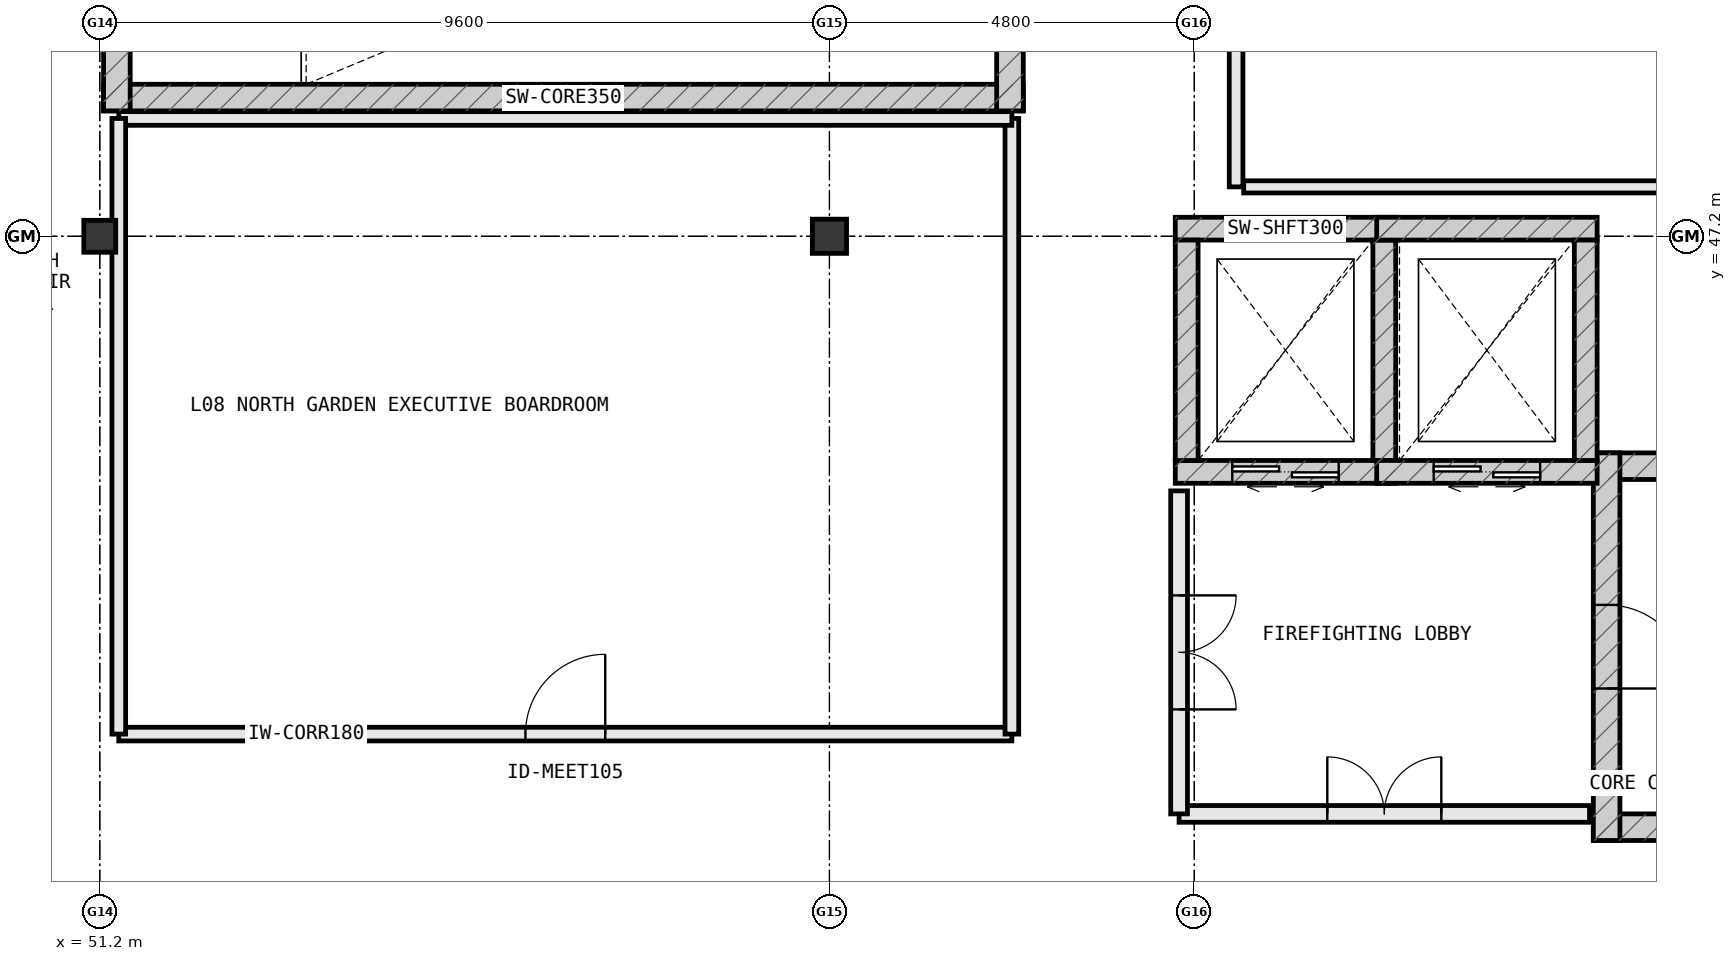
"""IFC4 building model, lengths in metres.
Left out: names, types, materials, properties, quantities, classifications, styles, units other than length and angle.
Written with IfcOpenShell. Run it as: python <this file> out.ifc"""

import sys

from ifc_helpers import new_model, si_unit, direction, frame, frame_2d, origin, origin_2d, place, context, subcontext, project, spatial, rectangle, extrude, element, fill, save


model = new_model("IFC4")
c1 = context("Model", 3, precision=1e-05, world=origin(), true_north=direction((0.0, 1.0)))
c2 = subcontext(c1, "Body", "Model", "MODEL_VIEW")
j1 = project(units=[si_unit("LENGTHUNIT", "METRE"), si_unit("PLANEANGLEUNIT", "RADIAN")], contexts=[c1])
p1 = place(None, origin())
s1 = spatial("IfcSite", under=j1, at=p1, CompositionType="ELEMENT")
p2 = place(p1, origin())
s2 = spatial("IfcBuilding", under=s1, at=p2, CompositionType="ELEMENT")
p3 = place(p2, frame((0.0, 0.0, 35.2)))
s3 = spatial("IfcBuildingStorey", under=s2, at=p3, CompositionType="ELEMENT", Elevation=35.2)
p4 = place(p3, frame((60.8, 47.2, 0.0), z_axis=(0.0, 0.0, 1.0), x_axis=(1.0, 0.0, 0.0)))
e1 = element("IfcColumn", 1, at=p4, inside=s3, PredefinedType="COLUMN", context=c2, shape_type="SweptSolid", body=[
    extrude(rectangle(XDim=0.45, YDim=0.45, at=origin_2d()), origin(), (0.0, 0.0, 1.0), 3.8),
])
p5 = place(p3, frame((51.2, 47.2, 0.0), z_axis=(0.0, 0.0, 1.0), x_axis=(1.0, 0.0, 0.0)))
e2 = element("IfcColumn", 2, at=p5, inside=s3, PredefinedType="COLUMN", context=c2, shape_type="SweptSolid", body=[
    extrude(rectangle(XDim=0.42, YDim=0.42, at=origin_2d()), origin(), (0.0, 0.0, 1.0), 3.8),
])
for number, where, z_axis, x_axis in (
    (3, (70.85, 39.425, 0.0), (0.0, 0.0, 1.0), (1.0, 0.0, 0.0)),
    (4, (82.95, 44.175, 0.0), (0.0, 0.0, 1.0), (-1.0, 0.0, 0.0)),
):
    element("IfcWall", number, at=place(p3, frame(where, z_axis=z_axis, x_axis=x_axis)), inside=s3, PredefinedType="SHEAR", context=c2, shape_type="SweptSolid", body=[
        extrude(rectangle(XDim=12.1, YDim=0.35, at=frame_2d((6.05, 0.0))), origin(), (0.0, 0.0, 1.0), 3.8),
    ])
p6 = place(p3, frame((71.025, 44.35, 0.0), z_axis=(0.0, 0.0, 1.0), x_axis=(0.0, -1.0, 0.0)))
e5 = element("IfcWall", 5, at=p6, inside=s3, PredefinedType="SHEAR", context=c2, shape_type="SweptSolid", body=[
    extrude(rectangle(XDim=5.1, YDim=0.35, at=frame_2d((2.55, 0.0))), origin(), (0.0, 0.0, 1.0), 3.8),
])
p7 = place(p6, frame((2.0, 0.0, 0.0)))
e6 = element("IfcOpeningElement", 6, at=p7, cuts=e5, PredefinedType="OPENING", context=c2, shape_type="SweptSolid", body=[
    extrude(rectangle(XDim=1.1, YDim=2.2, at=frame_2d((0.55, 1.1))), frame((0.0, 0.187, 0.0), z_axis=(0.0, -1.0, 0.0), x_axis=(1.0, 0.0, 0.0)), (0.0, 0.0, 1.0), 0.374),
])
p8 = place(p3, frame((51.25, 49.025, 0.0), z_axis=(0.0, 0.0, 1.0), x_axis=(1.0, 0.0, 0.0)))
e7 = element("IfcWall", 7, at=p8, inside=s3, PredefinedType="SHEAR", context=c2, shape_type="SweptSolid", body=[
    extrude(rectangle(XDim=12.1, YDim=0.35, at=frame_2d((6.05, 0.0))), origin(), (0.0, 0.0, 1.0), 3.565),
])
p9 = place(p3, frame((63.175, 48.85, 0.0), z_axis=(0.0, 0.0, 1.0), x_axis=(0.0, 1.0, 0.0)))
e8 = element("IfcWall", 8, at=p9, inside=s3, PredefinedType="SHEAR", context=c2, shape_type="SweptSolid", body=[
    extrude(rectangle(XDim=4.5, YDim=0.35, at=frame_2d((2.25, 0.0))), origin(), (0.0, 0.0, 1.0), 3.565),
])
p10 = place(p3, frame((51.425, 53.35, 0.0), z_axis=(0.0, 0.0, 1.0), x_axis=(0.0, -1.0, 0.0)))
e9 = element("IfcWall", 9, at=p10, inside=s3, PredefinedType="SHEAR", context=c2, shape_type="SweptSolid", body=[
    extrude(rectangle(XDim=4.5, YDim=0.35, at=frame_2d((2.25, 0.0))), origin(), (0.0, 0.0, 1.0), 3.565),
])
p11 = place(p10, frame((1.7, 0.0, 0.0)))
e10 = element("IfcOpeningElement", 10, at=p11, cuts=e9, PredefinedType="OPENING", context=c2, shape_type="SweptSolid", body=[
    extrude(rectangle(XDim=1.1, YDim=2.2, at=frame_2d((0.55, 1.1))), frame((0.0, 0.187, 0.0), z_axis=(0.0, -1.0, 0.0), x_axis=(1.0, 0.0, 0.0)), (0.0, 0.0, 1.0), 0.374),
])
p12 = place(p3, frame((65.35, 44.1, 0.0), z_axis=(0.0, 0.0, 1.0), x_axis=(1.0, 0.0, 0.0)))
e11 = element("IfcWall", 11, at=p12, inside=s3, PredefinedType="SHEAR", context=c2, shape_type="SweptSolid", body=[
    extrude(rectangle(XDim=2.9, YDim=0.3, at=frame_2d((1.45, 0.0))), origin(), (0.0, 0.0, 1.0), 3.8),
])
p13 = place(p12, frame((0.75, 0.0, 0.0)))
e12 = element("IfcOpeningElement", 12, at=p13, cuts=e11, PredefinedType="OPENING", context=c2, shape_type="SweptSolid", body=[
    extrude(rectangle(XDim=1.4, YDim=2.2, at=frame_2d((0.7, 1.1))), frame((0.0, 0.162, 0.0), z_axis=(0.0, -1.0, 0.0), x_axis=(1.0, 0.0, 0.0)), (0.0, 0.0, 1.0), 0.324),
])
for number, where, z_axis, x_axis in (
    (13, (68.25, 47.3, 0.0), (0.0, 0.0, 1.0), (-1.0, 0.0, 0.0)),
    (14, (68.1, 44.25, 0.0), (0.0, 0.0, 1.0), (0.0, 1.0, 0.0)),
    (15, (65.5, 47.15, 0.0), (0.0, 0.0, 1.0), (0.0, -1.0, 0.0)),
):
    element("IfcWall", number, at=place(p3, frame(where, z_axis=z_axis, x_axis=x_axis)), inside=s3, PredefinedType="SHEAR", context=c2, shape_type="SweptSolid", body=[
        extrude(rectangle(XDim=2.9, YDim=0.3, at=frame_2d((1.45, 0.0))), origin(), (0.0, 0.0, 1.0), 3.8),
    ])
p14 = place(p3, frame((68.0, 44.1, 0.0), z_axis=(0.0, 0.0, 1.0), x_axis=(1.0, 0.0, 0.0)))
e16 = element("IfcWall", 16, at=p14, inside=s3, PredefinedType="SHEAR", context=c2, shape_type="SweptSolid", body=[
    extrude(rectangle(XDim=2.9, YDim=0.3, at=frame_2d((1.45, 0.0))), origin(), (0.0, 0.0, 1.0), 3.8),
])
p15 = place(p14, frame((0.75, 0.0, 0.0)))
e17 = element("IfcOpeningElement", 17, at=p15, cuts=e16, PredefinedType="OPENING", context=c2, shape_type="SweptSolid", body=[
    extrude(rectangle(XDim=1.4, YDim=2.2, at=frame_2d((0.7, 1.1))), frame((0.0, 0.162, 0.0), z_axis=(0.0, -1.0, 0.0), x_axis=(1.0, 0.0, 0.0)), (0.0, 0.0, 1.0), 0.324),
])
for number, where, z_axis, x_axis in (
    (18, (70.9, 47.3, 0.0), (0.0, 0.0, 1.0), (-1.0, 0.0, 0.0)),
    (19, (70.75, 44.25, 0.0), (0.0, 0.0, 1.0), (0.0, 1.0, 0.0)),
):
    element("IfcWall", number, at=place(p3, frame(where, z_axis=z_axis, x_axis=x_axis)), inside=s3, PredefinedType="SHEAR", context=c2, shape_type="SweptSolid", body=[
        extrude(rectangle(XDim=2.9, YDim=0.3, at=frame_2d((1.45, 0.0))), origin(), (0.0, 0.0, 1.0), 3.8),
    ])
p16 = place(p3, frame((65.4, 39.6, 0.0), z_axis=(0.0, 0.0, 1.0), x_axis=(1.0, 0.0, 0.0)))
e20 = element("IfcWall", 20, at=p16, inside=s3, PredefinedType="STANDARD", context=c2, shape_type="SweptSolid", body=[
    extrude(rectangle(XDim=5.4, YDim=0.22, at=frame_2d((2.7, 0.0))), origin(), (0.0, 0.0, 1.0), 3.565),
])
p17 = place(p16, frame((1.95, 0.0, 0.0)))
e21 = element("IfcOpeningElement", 21, at=p17, cuts=e20, PredefinedType="OPENING", context=c2, shape_type="SweptSolid", body=[
    extrude(rectangle(XDim=1.5, YDim=2.2, at=frame_2d((0.75, 1.1))), frame((0.0, 0.122, 0.0), z_axis=(0.0, -1.0, 0.0), x_axis=(1.0, 0.0, 0.0)), (0.0, 0.0, 1.0), 0.244),
])
p18 = place(p3, frame((65.4, 43.85, 0.0), z_axis=(0.0, 0.0, 1.0), x_axis=(0.0, -1.0, 0.0)))
e22 = element("IfcWall", 22, at=p18, inside=s3, PredefinedType="STANDARD", context=c2, shape_type="SweptSolid", body=[
    extrude(rectangle(XDim=4.25, YDim=0.22, at=frame_2d((2.125, 0.0))), origin(), (0.0, 0.0, 1.0), 3.565),
])
p19 = place(p18, frame((1.375, 0.0, 0.0)))
e23 = element("IfcOpeningElement", 23, at=p19, cuts=e22, PredefinedType="OPENING", context=c2, shape_type="SweptSolid", body=[
    extrude(rectangle(XDim=1.5, YDim=2.2, at=frame_2d((0.75, 1.1))), frame((0.0, 0.122, 0.0), z_axis=(0.0, -1.0, 0.0), x_axis=(1.0, 0.0, 0.0)), (0.0, 0.0, 1.0), 0.244),
])
p20 = place(p3, frame((51.45, 40.65, 0.0), z_axis=(0.0, 0.0, 1.0), x_axis=(1.0, 0.0, 0.0)))
e24 = element("IfcWall", 24, at=p20, inside=s3, PredefinedType="PARTITIONING", context=c2, shape_type="SweptSolid", body=[
    extrude(rectangle(XDim=11.75, YDim=0.18, at=frame_2d((5.875, 0.0))), origin(), (0.0, 0.0, 1.0), 3.565),
])
p21 = place(p20, frame((5.35, 0.0, 0.0)))
e25 = element("IfcOpeningElement", 25, at=p21, cuts=e24, PredefinedType="OPENING", context=c2, shape_type="SweptSolid", body=[
    extrude(rectangle(XDim=1.05, YDim=2.2, at=frame_2d((0.525, 1.1))), frame((0.0, 0.102, 0.0), z_axis=(0.0, -1.0, 0.0), x_axis=(1.0, 0.0, 0.0)), (0.0, 0.0, 1.0), 0.204),
])
p22 = place(p3, frame((63.2, 40.65, 0.0), z_axis=(0.0, 0.0, 1.0), x_axis=(0.0, 1.0, 0.0)))
e26 = element("IfcWall", 26, at=p22, inside=s3, PredefinedType="PARTITIONING", context=c2, shape_type="SweptSolid", body=[
    extrude(rectangle(XDim=8.1, YDim=0.18, at=frame_2d((4.05, 0.0))), origin(), (0.0, 0.0, 1.0), 3.565),
])
p23 = place(p3, frame((63.2, 48.75, 0.0), z_axis=(0.0, 0.0, 1.0), x_axis=(-1.0, 0.0, 0.0)))
e27 = element("IfcWall", 27, at=p23, inside=s3, PredefinedType="PARTITIONING", context=c2, shape_type="SweptSolid", body=[
    extrude(rectangle(XDim=11.75, YDim=0.18, at=frame_2d((5.875, 0.0))), origin(), (0.0, 0.0, 1.0), 3.565),
])
p24 = place(p3, frame((51.45, 48.75, 0.0), z_axis=(0.0, 0.0, 1.0), x_axis=(0.0, -1.0, 0.0)))
e28 = element("IfcWall", 28, at=p24, inside=s3, PredefinedType="PARTITIONING", context=c2, shape_type="SweptSolid", body=[
    extrude(rectangle(XDim=8.1, YDim=0.18, at=frame_2d((4.05, 0.0))), origin(), (0.0, 0.0, 1.0), 2.92),
])
p25 = place(p3, frame((66.15, 52.55, 0.0), z_axis=(0.0, 0.0, 1.0), x_axis=(0.0, -1.0, 0.0)))
e29 = element("IfcWall", 29, at=p25, inside=s3, PredefinedType="PARTITIONING", context=c2, shape_type="SweptSolid", body=[
    extrude(rectangle(XDim=4.7, YDim=0.18, at=frame_2d((2.35, 0.0))), origin(), (0.0, 0.0, 1.0), 3.565),
])
p26 = place(p25, frame((0.88, 0.0, 0.0)))
e30 = element("IfcOpeningElement", 30, at=p26, cuts=e29, PredefinedType="OPENING", context=c2, shape_type="SweptSolid", body=[
    extrude(rectangle(XDim=0.98, YDim=2.18, at=frame_2d((0.49, 1.09))), frame((0.0, 0.102, 0.0), z_axis=(0.0, -1.0, 0.0), x_axis=(1.0, 0.0, 0.0)), (0.0, 0.0, 1.0), 0.204),
])
p27 = place(p3, frame((66.25, 47.85, 0.0), z_axis=(0.0, 0.0, 1.0), x_axis=(1.0, 0.0, 0.0)))
e31 = element("IfcWall", 31, at=p27, inside=s3, PredefinedType="PARTITIONING", context=c2, shape_type="SweptSolid", body=[
    extrude(rectangle(XDim=17.59, YDim=0.16, at=frame_2d((8.795, 0.0))), origin(), (0.0, 0.0, 1.0), 3.565),
])
p28 = place(p7, origin())
e32 = element("IfcDoor", 32, at=p28, inside=s3, OperationType="SINGLE_SWING_RIGHT", PredefinedType="DOOR", context=c2, shape_type="SweptSolid", body=[
    extrude(rectangle(XDim=1.1, YDim=2.2, at=frame_2d((0.55, 1.1))), frame((0.0, 0.025, 0.0), z_axis=(0.0, -1.0, 0.0), x_axis=(1.0, 0.0, 0.0)), (0.0, 0.0, 1.0), 0.05),
])
fill(e6, e32)
p29 = place(p13, origin())
e33 = element("IfcDoor", 33, at=p29, inside=s3, OperationType="DOUBLE_DOOR_SLIDING", PredefinedType="DOOR", context=c2, shape_type="SweptSolid", body=[
    extrude(rectangle(XDim=1.4, YDim=2.2, at=frame_2d((0.7, 1.1))), frame((0.0, 0.025, 0.0), z_axis=(0.0, -1.0, 0.0), x_axis=(1.0, 0.0, 0.0)), (0.0, 0.0, 1.0), 0.05),
])
fill(e12, e33)
p30 = place(p15, origin())
e34 = element("IfcDoor", 34, at=p30, inside=s3, OperationType="DOUBLE_DOOR_SLIDING", PredefinedType="DOOR", context=c2, shape_type="SweptSolid", body=[
    extrude(rectangle(XDim=1.4, YDim=2.2, at=frame_2d((0.7, 1.1))), frame((0.0, 0.025, 0.0), z_axis=(0.0, -1.0, 0.0), x_axis=(1.0, 0.0, 0.0)), (0.0, 0.0, 1.0), 0.05),
])
fill(e17, e34)
p31 = place(p17, origin())
e35 = element("IfcDoor", 35, at=p31, inside=s3, OperationType="DOUBLE_DOOR_SINGLE_SWING", PredefinedType="DOOR", context=c2, shape_type="SweptSolid", body=[
    extrude(rectangle(XDim=1.5, YDim=2.2, at=frame_2d((0.75, 1.1))), frame((0.0, 0.025, 0.0), z_axis=(0.0, -1.0, 0.0), x_axis=(1.0, 0.0, 0.0)), (0.0, 0.0, 1.0), 0.05),
])
fill(e21, e35)
p32 = place(p19, origin())
e36 = element("IfcDoor", 36, at=p32, inside=s3, OperationType="DOUBLE_DOOR_SINGLE_SWING", PredefinedType="DOOR", context=c2, shape_type="SweptSolid", body=[
    extrude(rectangle(XDim=1.5, YDim=2.2, at=frame_2d((0.75, 1.1))), frame((0.0, 0.025, 0.0), z_axis=(0.0, -1.0, 0.0), x_axis=(1.0, 0.0, 0.0)), (0.0, 0.0, 1.0), 0.05),
])
fill(e23, e36)
p33 = place(p21, origin())
e37 = element("IfcDoor", 37, at=p33, inside=s3, OperationType="SINGLE_SWING_RIGHT", PredefinedType="DOOR", context=c2, shape_type="SweptSolid", body=[
    extrude(rectangle(XDim=1.05, YDim=2.2, at=frame_2d((0.525, 1.1))), frame((0.0, 0.025, 0.0), z_axis=(0.0, -1.0, 0.0), x_axis=(1.0, 0.0, 0.0)), (0.0, 0.0, 1.0), 0.05),
])
fill(e25, e37)
save(model, sys.argv[1])
